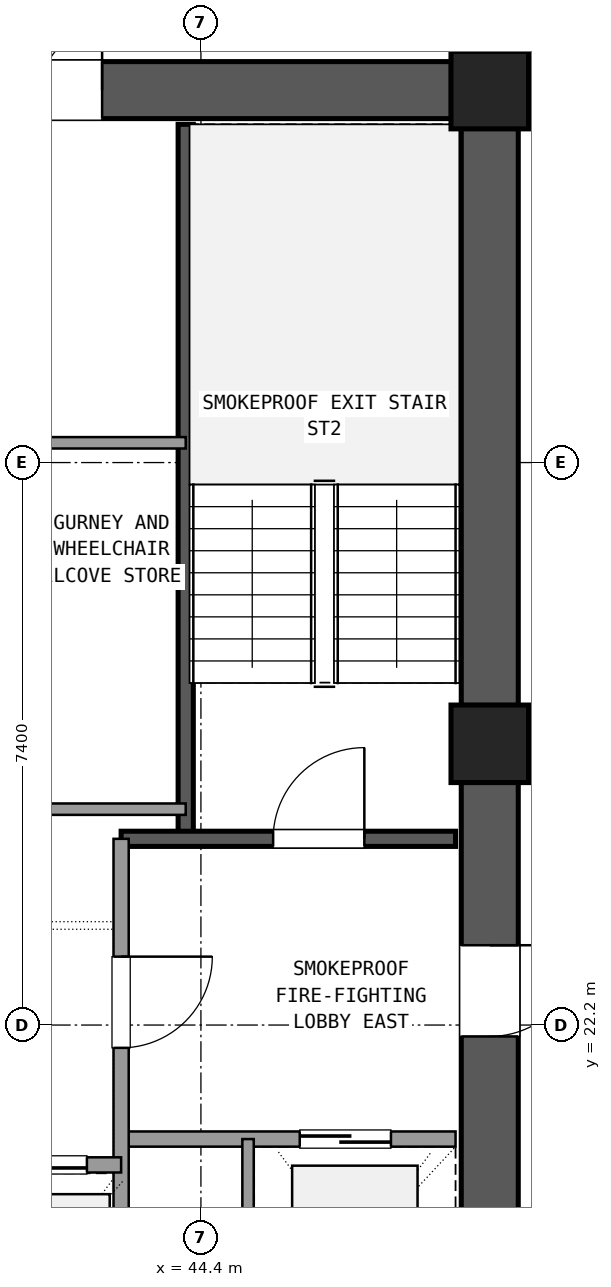
"""IFC4 building model, lengths in metres.
Left out: names, types, materials, properties, quantities, classifications, styles, units other than length and angle.
Written with IfcOpenShell. Run it as: python <this file> out.ifc"""

import sys

from ifc_helpers import new_model, si_unit, direction, frame, frame_2d, origin, origin_2d, place, context, subcontext, project, spatial, rectangle, extrude, element, fill, save


model = new_model("IFC4")
c1 = context("Model", 3, precision=1e-05, world=origin(), true_north=direction((0.0, 1.0)))
c2 = subcontext(c1, "Body", "Model", "MODEL_VIEW")
j1 = project(units=[si_unit("LENGTHUNIT", "METRE"), si_unit("PLANEANGLEUNIT", "RADIAN")], contexts=[c1])
p1 = place(None, origin())
s1 = spatial("IfcSite", under=j1, at=p1, CompositionType="ELEMENT")
p2 = place(p1, origin())
s2 = spatial("IfcBuilding", under=s1, at=p2, CompositionType="ELEMENT")
p3 = place(p2, frame((0.0, 0.0, 109.98)))
s3 = spatial("IfcBuildingStorey", under=s2, at=p3, CompositionType="ELEMENT", Elevation=109.98)
for number, where, z_axis, x_axis in (
    (1, (48.2, 25.9, 0.0), (0.0, 0.0, 1.0), (1.0, 0.0, 0.0)),
    (2, (48.2, 34.5, 0.0), (0.0, 0.0, 1.0), (1.0, 0.0, 0.0)),
):
    element("IfcColumn", number, at=place(p3, frame(where, z_axis=z_axis, x_axis=x_axis)), inside=s3, PredefinedType="COLUMN", context=c2, shape_type="SweptSolid", body=[
        extrude(rectangle(XDim=1.02, YDim=1.02, at=origin_2d()), origin(), (0.0, 0.0, 1.0), 3.6),
    ])
p4 = place(p3, frame((48.2, 17.805, 0.0), z_axis=(0.0, 0.0, 1.0), x_axis=(0.0, 1.0, 0.0)))
e3 = element("IfcWall", 3, at=p4, inside=s3, PredefinedType="SHEAR", context=c2, shape_type="SweptSolid", body=[
    extrude(rectangle(XDim=7.59, YDim=0.75, at=frame_2d((3.795, 0.0))), origin(), (0.0, 0.0, 1.0), 3.32),
])
p5 = place(p4, frame((4.245, 0.0, 0.0)))
e4 = element("IfcOpeningElement", 4, at=p5, cuts=e3, PredefinedType="OPENING", context=c2, shape_type="SweptSolid", body=[
    extrude(rectangle(XDim=1.2, YDim=2.15, at=frame_2d((0.6, 1.075))), frame((0.0, 0.385, 0.0), z_axis=(0.0, -1.0, 0.0), x_axis=(1.0, 0.0, 0.0)), (0.0, 0.0, 1.0), 0.77),
])
p6 = place(p3, frame((48.2, 26.405, 0.0), z_axis=(0.0, 0.0, 1.0), x_axis=(0.0, 1.0, 0.0)))
e5 = element("IfcWall", 5, at=p6, inside=s3, PredefinedType="SHEAR", context=c2, shape_type="SweptSolid", body=[
    extrude(rectangle(XDim=7.59, YDim=0.75, at=frame_2d((3.795, 0.0))), origin(), (0.0, 0.0, 1.0), 3.32),
])
p7 = place(p3, frame((47.695, 34.5, 0.0), z_axis=(0.0, 0.0, 1.0), x_axis=(-1.0, 0.0, 0.0)))
e6 = element("IfcWall", 6, at=p7, inside=s3, PredefinedType="SHEAR", context=c2, shape_type="SweptSolid", body=[
    extrude(rectangle(XDim=10.19, YDim=0.75, at=frame_2d((5.095, 0.0))), origin(), (0.0, 0.0, 1.0), 3.32),
])
p8 = place(p7, frame((4.595, 0.0, 0.0)))
e7 = element("IfcOpeningElement", 7, at=p8, cuts=e6, PredefinedType="OPENING", context=c2, shape_type="SweptSolid", body=[
    extrude(rectangle(XDim=1.6, YDim=2.2, at=frame_2d((0.8, 1.1))), frame((0.0, 0.385, 0.0), z_axis=(0.0, -1.0, 0.0), x_axis=(1.0, 0.0, 0.0)), (0.0, 0.0, 1.0), 0.77),
])
p9 = place(p3, frame((44.2, 24.65, 0.0), z_axis=(0.0, 0.0, 1.0), x_axis=(0.0, 1.0, 0.0)))
e8 = element("IfcWall", 8, at=p9, inside=s3, PredefinedType="SHEAR", context=c2, shape_type="SweptSolid", body=[
    extrude(rectangle(XDim=9.4, YDim=0.2, at=frame_2d((4.7, 0.0))), origin(), (0.0, 0.0, 1.0), 3.32),
])
p10 = place(p3, frame((43.35, 24.65, 0.0), z_axis=(0.0, 0.0, 1.0), x_axis=(1.0, 0.0, 0.0)))
e9 = element("IfcWall", 9, at=p10, inside=s3, PredefinedType="SHEAR", context=c2, shape_type="SweptSolid", body=[
    extrude(rectangle(XDim=4.4, YDim=0.2, at=frame_2d((2.2, 0.0))), origin(), (0.0, 0.0, 1.0), 3.32),
])
p11 = place(p10, frame((2.0, 0.0, 0.0)))
e10 = element("IfcOpeningElement", 10, at=p11, cuts=e9, PredefinedType="OPENING", context=c2, shape_type="SweptSolid", body=[
    extrude(rectangle(XDim=1.2, YDim=2.15, at=frame_2d((0.6, 1.075))), frame((0.0, 0.11, 0.0), z_axis=(0.0, -1.0, 0.0), x_axis=(1.0, 0.0, 0.0)), (0.0, 0.0, 1.0), 0.22),
])
p12 = place(p3, frame((43.35, 20.7, 0.0), z_axis=(0.0, 0.0, 1.0), x_axis=(1.0, 0.0, 0.0)))
e11 = element("IfcWall", 11, at=p12, inside=s3, PredefinedType="SOLIDWALL", context=c2, shape_type="SweptSolid", body=[
    extrude(rectangle(XDim=4.4, YDim=0.2, at=frame_2d((2.2, 0.0))), origin(), (0.0, 0.0, 1.0), 2.61),
])
p13 = place(p12, frame((2.35, 0.0, 0.0)))
e12 = element("IfcOpeningElement", 12, at=p13, cuts=e11, PredefinedType="OPENING", context=c2, shape_type="SweptSolid", body=[
    extrude(rectangle(XDim=1.2, YDim=2.15, at=frame_2d((0.6, 1.075))), frame((0.0, 0.11, 0.0), z_axis=(0.0, -1.0, 0.0), x_axis=(1.0, 0.0, 0.0)), (0.0, 0.0, 1.0), 0.22),
])
p14 = place(p3, frame((43.35, 17.75, 0.0), z_axis=(0.0, 0.0, 1.0), x_axis=(0.0, 1.0, 0.0)))
e13 = element("IfcWall", 13, at=p14, inside=s3, PredefinedType="SOLIDWALL", context=c2, shape_type="SweptSolid", body=[
    extrude(rectangle(XDim=6.9, YDim=0.2, at=frame_2d((3.45, 0.0))), origin(), (0.0, 0.0, 1.0), 2.61),
])
p15 = place(p14, frame((4.15, 0.0, 0.0)))
e14 = element("IfcOpeningElement", 14, at=p15, cuts=e13, PredefinedType="OPENING", context=c2, shape_type="SweptSolid", body=[
    extrude(rectangle(XDim=1.2, YDim=2.15, at=frame_2d((0.6, 1.075))), frame((0.0, 0.11, 0.0), z_axis=(0.0, -1.0, 0.0), x_axis=(1.0, 0.0, 0.0)), (0.0, 0.0, 1.0), 0.22),
])
p16 = place(p3, frame((45.02, 17.75, 0.0), z_axis=(0.0, 0.0, 1.0), x_axis=(0.0, 1.0, 0.0)))
e15 = element("IfcWall", 15, at=p16, inside=s3, PredefinedType="PARTITIONING", context=c2, shape_type="SweptSolid", body=[
    extrude(rectangle(XDim=2.95, YDim=0.15, at=frame_2d((1.475, 0.0))), origin(), (0.0, 0.0, 1.0), 2.61),
])
p17 = place(p3, frame((37.25, 20.36, 0.0), z_axis=(0.0, 0.0, 1.0), x_axis=(1.0, 0.0, 0.0)))
e16 = element("IfcWall", 16, at=p17, inside=s3, PredefinedType="SOLIDWALL", context=c2, shape_type="SweptSolid", body=[
    extrude(rectangle(XDim=6.1, YDim=0.2, at=frame_2d((3.05, 0.0))), origin(), (0.0, 0.0, 1.0), 2.61),
])
p18 = place(p17, frame((0.45, 0.0, 0.0)))
e17 = element("IfcOpeningElement", 17, at=p18, cuts=e16, PredefinedType="OPENING", context=c2, shape_type="SweptSolid", body=[
    extrude(rectangle(XDim=1.1, YDim=2.15, at=frame_2d((0.55, 1.075))), frame((0.0, 0.11, 0.0), z_axis=(0.0, -1.0, 0.0), x_axis=(1.0, 0.0, 0.0)), (0.0, 0.0, 1.0), 0.22),
])
p19 = place(p17, frame((2.5, 0.0, 0.0)))
e18 = element("IfcOpeningElement", 18, at=p19, cuts=e16, PredefinedType="OPENING", context=c2, shape_type="SweptSolid", body=[
    extrude(rectangle(XDim=1.1, YDim=2.15, at=frame_2d((0.55, 1.075))), frame((0.0, 0.11, 0.0), z_axis=(0.0, -1.0, 0.0), x_axis=(1.0, 0.0, 0.0)), (0.0, 0.0, 1.0), 0.22),
])
p20 = place(p17, frame((4.55, 0.0, 0.0)))
e19 = element("IfcOpeningElement", 19, at=p20, cuts=e16, PredefinedType="OPENING", context=c2, shape_type="SweptSolid", body=[
    extrude(rectangle(XDim=1.1, YDim=2.15, at=frame_2d((0.55, 1.075))), frame((0.0, 0.11, 0.0), z_axis=(0.0, -1.0, 0.0), x_axis=(1.0, 0.0, 0.0)), (0.0, 0.0, 1.0), 0.22),
])
for number, where, z_axis, x_axis in (
    (20, (42.27, 25.04, 0.0), (0.0, 0.0, 1.0), (1.0, 0.0, 0.0)),
    (21, (42.27, 29.86, 0.0), (0.0, 0.0, 1.0), (1.0, 0.0, 0.0)),
):
    element("IfcWall", number, at=place(p3, frame(where, z_axis=z_axis, x_axis=x_axis)), inside=s3, PredefinedType="PARTITIONING", context=c2, shape_type="SweptSolid", body=[
        extrude(rectangle(XDim=1.93, YDim=0.15, at=frame_2d((0.965, 0.0))), origin(), (0.0, 0.0, 1.0), 2.61),
    ])
p21 = place(p11, origin())
e22 = element("IfcDoor", 22, at=p21, inside=s3, OperationType="SINGLE_SWING_RIGHT", PredefinedType="DOOR", context=c2, shape_type="SweptSolid", body=[
    extrude(rectangle(XDim=1.2, YDim=2.15, at=frame_2d((0.6, 1.075))), frame((0.0, 0.025, 0.0), z_axis=(0.0, -1.0, 0.0), x_axis=(1.0, 0.0, 0.0)), (0.0, 0.0, 1.0), 0.05),
])
fill(e10, e22)
p22 = place(p13, origin())
e23 = element("IfcDoor", 23, at=p22, inside=s3, OperationType="SLIDING_TO_RIGHT", PredefinedType="DOOR", context=c2, shape_type="SweptSolid", body=[
    extrude(rectangle(XDim=1.2, YDim=2.15, at=frame_2d((0.6, 1.075))), frame((0.0, 0.025, 0.0), z_axis=(0.0, -1.0, 0.0), x_axis=(1.0, 0.0, 0.0)), (0.0, 0.0, 1.0), 0.05),
])
fill(e12, e23)
p23 = place(p15, frame((1.2, 0.0, 0.0), z_axis=(0.0, 0.0, 1.0), x_axis=(-1.0, 0.0, 0.0)))
e24 = element("IfcDoor", 24, at=p23, inside=s3, OperationType="SINGLE_SWING_RIGHT", PredefinedType="DOOR", context=c2, shape_type="SweptSolid", body=[
    extrude(rectangle(XDim=1.2, YDim=2.15, at=frame_2d((0.6, 1.075))), frame((0.0, 0.025, 0.0), z_axis=(0.0, -1.0, 0.0), x_axis=(1.0, 0.0, 0.0)), (0.0, 0.0, 1.0), 0.05),
])
fill(e14, e24)
p24 = place(p5, frame((1.2, 0.0, 0.0), z_axis=(0.0, 0.0, 1.0), x_axis=(-1.0, 0.0, 0.0)))
e25 = element("IfcDoor", 25, at=p24, inside=s3, OperationType="SINGLE_SWING_RIGHT", PredefinedType="DOOR", context=c2, shape_type="SweptSolid", body=[
    extrude(rectangle(XDim=1.2, YDim=2.15, at=frame_2d((0.6, 1.075))), frame((0.0, 0.025, 0.0), z_axis=(0.0, -1.0, 0.0), x_axis=(1.0, 0.0, 0.0)), (0.0, 0.0, 1.0), 0.05),
])
fill(e4, e25)
p25 = place(p8, frame((1.6, 0.0, 0.0), z_axis=(0.0, 0.0, 1.0), x_axis=(-1.0, 0.0, 0.0)))
e26 = element("IfcDoor", 26, at=p25, inside=s3, OperationType="DOUBLE_DOOR_SINGLE_SWING", PredefinedType="DOOR", context=c2, shape_type="SweptSolid", body=[
    extrude(rectangle(XDim=1.6, YDim=2.2, at=frame_2d((0.8, 1.1))), frame((0.0, 0.025, 0.0), z_axis=(0.0, -1.0, 0.0), x_axis=(1.0, 0.0, 0.0)), (0.0, 0.0, 1.0), 0.05),
])
fill(e7, e26)
p26 = place(p20, origin())
e27 = element("IfcDoor", 27, at=p26, inside=s3, OperationType="SLIDING_TO_LEFT", PredefinedType="DOOR", context=c2, shape_type="SweptSolid", body=[
    extrude(rectangle(XDim=1.1, YDim=2.15, at=frame_2d((0.55, 1.075))), frame((0.0, 0.025, 0.0), z_axis=(0.0, -1.0, 0.0), x_axis=(1.0, 0.0, 0.0)), (0.0, 0.0, 1.0), 0.05),
])
fill(e19, e27)
save(model, sys.argv[1])
